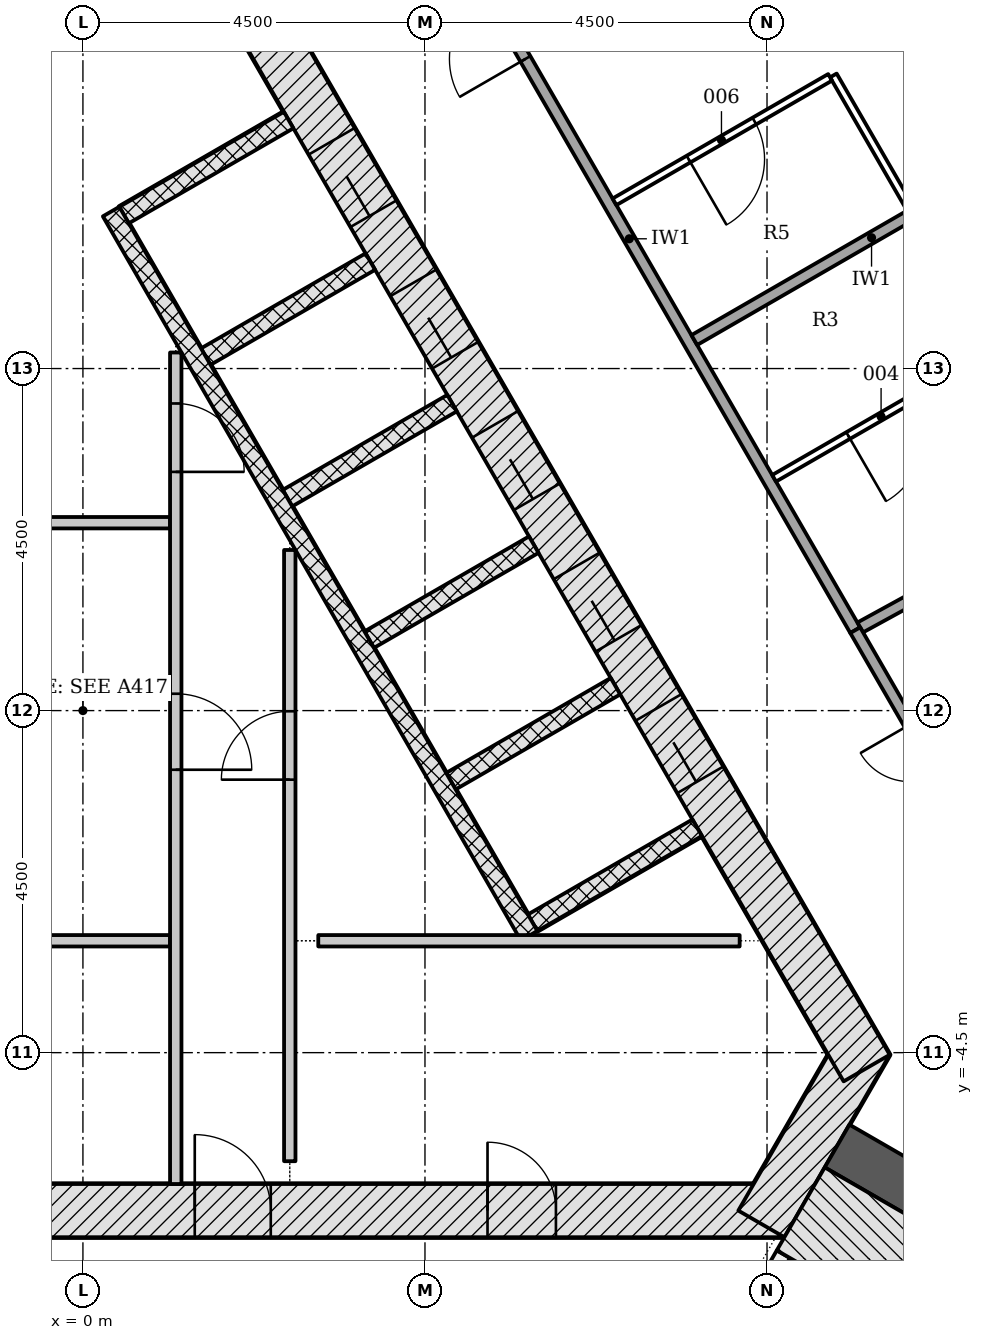
"""IFC4 building model, lengths in metres.
Left out: names, types, materials, properties, quantities, classifications, styles, units other than length and angle.
Written with IfcOpenShell. Run it as: python <this file> out.ifc"""

import sys

from ifc_helpers import new_model, si_unit, direction, frame, frame_2d, origin, place, context, subcontext, project, spatial, rectangle, extrude, element, fill, save


model = new_model("IFC4")
c1 = context("Model", 3, precision=1e-05, world=origin(), true_north=direction((0.0, 1.0)))
c2 = subcontext(c1, "Body", "Model", "MODEL_VIEW")
j1 = project(units=[si_unit("LENGTHUNIT", "METRE"), si_unit("PLANEANGLEUNIT", "RADIAN")], contexts=[c1])
p1 = place(None, origin())
s1 = spatial("IfcSite", under=j1, at=p1, CompositionType="ELEMENT")
p2 = place(p1, origin())
s2 = spatial("IfcBuilding", under=s1, at=p2, CompositionType="ELEMENT")
p3 = place(p2, frame((0.0, 0.0, 222.0)))
s3 = spatial("IfcBuildingStorey", under=s2, at=p3, CompositionType="ELEMENT", Elevation=222.0)
p4 = place(p3, frame((-9.229, -6.578, -0.2), z_axis=(0.0, 0.0, 1.0), x_axis=(1.0, 0.0, 0.0)))
e1 = element("IfcWall", 1, at=p4, inside=s3, PredefinedType="SHEAR", context=c2, shape_type="SweptSolid", body=[
    extrude(rectangle(XDim=18.458, YDim=0.7, at=frame_2d((9.229, 0.0))), origin(), (0.0, 0.0, 1.0), 3.6),
])
p5 = place(p4, frame((10.7, 0.0, 0.2)))
e2 = element("IfcOpeningElement", 2, at=p5, cuts=e1, PredefinedType="OPENING", context=c2, shape_type="SweptSolid", body=[
    extrude(rectangle(XDim=1.0, YDim=2.1, at=frame_2d((0.5, 1.05))), frame((0.0, 0.36, 0.0), z_axis=(0.0, -1.0, 0.0), x_axis=(1.0, 0.0, 0.0)), (0.0, 0.0, 1.0), 0.72),
])
p6 = place(p4, frame((4.977, 0.0, 0.2)))
e3 = element("IfcOpeningElement", 3, at=p6, cuts=e1, PredefinedType="OPENING", context=c2, shape_type="SweptSolid", body=[
    extrude(rectangle(XDim=0.9, YDim=2.1, at=frame_2d((0.45, 1.05))), frame((0.0, 0.36, 0.0), z_axis=(0.0, -1.0, 0.0), x_axis=(1.0, 0.0, 0.0)), (0.0, 0.0, 1.0), 0.72),
])
p7 = place(p4, frame((14.552, 0.0, 0.2)))
e4 = element("IfcOpeningElement", 4, at=p7, cuts=e1, PredefinedType="OPENING", context=c2, shape_type="SweptSolid", body=[
    extrude(rectangle(XDim=0.9, YDim=2.1, at=frame_2d((0.45, 1.05))), frame((0.0, 0.36, 0.0), z_axis=(0.0, -1.0, 0.0), x_axis=(1.0, 0.0, 0.0)), (0.0, 0.0, 1.0), 0.72),
])
p8 = place(p3, frame((8.926, -6.753, -0.2), z_axis=(0.0, 0.0, 1.0), x_axis=(0.500042739161, 0.866000726912, 0.0)))
e5 = element("IfcWall", 5, at=p8, inside=s3, PredefinedType="SHEAR", context=c2, shape_type="SweptSolid", body=[
    extrude(rectangle(XDim=2.771, YDim=0.7, at=frame_2d((1.386, 0.0))), origin(), (0.0, 0.0, 1.0), 3.6),
])
p9 = place(p3, frame((10.311, -4.703, -0.2), z_axis=(0.0, 0.0, 1.0), x_axis=(-0.500001446645, 0.866024568562, 0.0)))
e6 = element("IfcWall", 6, at=p9, inside=s3, PredefinedType="SHEAR", context=c2, shape_type="SweptSolid", body=[
    extrude(rectangle(XDim=18.458, YDim=0.7, at=frame_2d((9.229, 0.0))), origin(), (0.0, 0.0, 1.0), 3.6),
])
p10 = place(p9, frame((4.379, 0.0, 0.2)))
e7 = element("IfcOpeningElement", 7, at=p10, cuts=e6, PredefinedType="OPENING", context=c2, shape_type="SweptSolid", body=[
    extrude(rectangle(XDim=1.1, YDim=2.1, at=frame_2d((0.55, 1.05))), frame((0.0, 0.36, 0.0), z_axis=(0.0, -1.0, 0.0), x_axis=(1.0, 0.0, 0.0)), (0.0, 0.0, 1.0), 0.72),
])
p11 = place(p9, frame((6.529, 0.0, 0.2)))
e8 = element("IfcOpeningElement", 8, at=p11, cuts=e6, PredefinedType="OPENING", context=c2, shape_type="SweptSolid", body=[
    extrude(rectangle(XDim=1.1, YDim=2.1, at=frame_2d((0.55, 1.05))), frame((0.0, 0.36, 0.0), z_axis=(0.0, -1.0, 0.0), x_axis=(1.0, 0.0, 0.0)), (0.0, 0.0, 1.0), 0.72),
])
p12 = place(p9, frame((8.679, 0.0, 0.2)))
e9 = element("IfcOpeningElement", 9, at=p12, cuts=e6, PredefinedType="OPENING", context=c2, shape_type="SweptSolid", body=[
    extrude(rectangle(XDim=1.1, YDim=2.1, at=frame_2d((0.55, 1.05))), frame((0.0, 0.36, 0.0), z_axis=(0.0, -1.0, 0.0), x_axis=(1.0, 0.0, 0.0)), (0.0, 0.0, 1.0), 0.72),
])
p13 = place(p9, frame((10.829, 0.0, 0.2)))
e10 = element("IfcOpeningElement", 10, at=p13, cuts=e6, PredefinedType="OPENING", context=c2, shape_type="SweptSolid", body=[
    extrude(rectangle(XDim=1.1, YDim=2.1, at=frame_2d((0.55, 1.05))), frame((0.0, 0.36, 0.0), z_axis=(0.0, -1.0, 0.0), x_axis=(1.0, 0.0, 0.0)), (0.0, 0.0, 1.0), 0.72),
])
p14 = place(p9, frame((12.979, 0.0, 0.2)))
e11 = element("IfcOpeningElement", 11, at=p14, cuts=e6, PredefinedType="OPENING", context=c2, shape_type="SweptSolid", body=[
    extrude(rectangle(XDim=1.1, YDim=2.1, at=frame_2d((0.55, 1.05))), frame((0.0, 0.36, 0.0), z_axis=(0.0, -1.0, 0.0), x_axis=(1.0, 0.0, 0.0)), (0.0, 0.0, 1.0), 0.72),
])
p15 = place(p3, frame((9.922, -5.728, -0.2), z_axis=(0.0, 0.0, 1.0), x_axis=(0.866030911543, -0.499990460161, 0.0)))
e12 = element("IfcWall", 12, at=p15, inside=s3, PredefinedType="SHEAR", context=c2, shape_type="SweptSolid", body=[
    extrude(rectangle(XDim=8.359, YDim=0.65, at=frame_2d((4.179, 0.0))), origin(), (0.0, 0.0, 1.0), 3.6),
])
for number, where, z_axis, x_axis in (
    (13, (8.081, -1.541, -0.2), (0.0, 0.0, 1.0), (-0.866, -0.5, 0.0)),
    (14, (7.006, 0.321, -0.2), (0.0, 0.0, 1.0), (-0.866, -0.5, 0.0)),
):
    element("IfcWall", number, at=place(p3, frame(where, z_axis=z_axis, x_axis=x_axis)), inside=s3, PredefinedType="PARTITIONING", context=c2, shape_type="SweptSolid", body=[
        extrude(rectangle(XDim=2.5, YDim=0.25, at=frame_2d((1.25, 0.0))), origin(), (0.0, 0.0, 1.0), 3.6),
    ])
p16 = place(p3, frame((5.931, 2.183, -0.2), z_axis=(0.0, 0.0, 1.0), x_axis=(-0.866047370643, -0.499961950354, 0.0)))
e15 = element("IfcWall", 15, at=p16, inside=s3, PredefinedType="PARTITIONING", context=c2, shape_type="SweptSolid", body=[
    extrude(rectangle(XDim=2.5, YDim=0.25, at=frame_2d((1.25, 0.0))), origin(), (0.0, 0.0, 1.0), 3.6),
])
for number, where, z_axis, x_axis in (
    (16, (4.856, 4.045, -0.2), (0.0, 0.0, 1.0), (-0.866, -0.5, 0.0)),
    (17, (3.781, 5.907, -0.2), (0.0, 0.0, 1.0), (-0.866, -0.5, 0.0)),
    (18, (2.706, 7.769, -0.2), (0.0, 0.0, 1.0), (-0.866, -0.5, 0.0)),
):
    element("IfcWall", number, at=place(p3, frame(where, z_axis=z_axis, x_axis=x_axis)), inside=s3, PredefinedType="PARTITIONING", context=c2, shape_type="SweptSolid", body=[
        extrude(rectangle(XDim=2.5, YDim=0.25, at=frame_2d((1.25, 0.0))), origin(), (0.0, 0.0, 1.0), 3.6),
    ])
p17 = place(p3, frame((5.87, -2.961, 0.0), z_axis=(0.0, 0.0, 1.0), x_axis=(-0.50000615651, 0.866021849293, 0.0)))
e19 = element("IfcWall", 19, at=p17, inside=s3, PredefinedType="PARTITIONING", context=c2, shape_type="SweptSolid", body=[
    extrude(rectangle(XDim=11.0, YDim=0.25, at=frame_2d((5.5, 0.0))), origin(), (0.0, 0.0, 1.0), 3.4),
])
p18 = place(p3, frame((-5.258, -3.028, 0.0), z_axis=(0.0, 0.0, 1.0), x_axis=(1.0, 0.0, 0.0)))
e20 = element("IfcWall", 20, at=p18, inside=s3, PredefinedType="PARTITIONING", context=c2, shape_type="SweptSolid", body=[
    extrude(rectangle(XDim=6.404, YDim=0.15, at=frame_2d((3.202, 0.0))), origin(), (0.0, 0.0, 1.0), 3.4),
])
p19 = place(p3, frame((-2.551, 2.472, 0.0), z_axis=(0.0, 0.0, 1.0), x_axis=(1.0, 0.0, 0.0)))
e21 = element("IfcWall", 21, at=p19, inside=s3, PredefinedType="PARTITIONING", context=c2, shape_type="SweptSolid", body=[
    extrude(rectangle(XDim=3.698, YDim=0.15, at=frame_2d((1.849, 0.0))), origin(), (0.0, 0.0, 1.0), 3.4),
])
p20 = place(p3, frame((1.221, 4.711, 0.0), z_axis=(0.0, 0.0, 1.0), x_axis=(0.0, -1.0, 0.0)))
e22 = element("IfcWall", 22, at=p20, inside=s3, PredefinedType="PARTITIONING", context=c2, shape_type="SweptSolid", body=[
    extrude(rectangle(XDim=10.939, YDim=0.15, at=frame_2d((5.47, 0.0))), origin(), (0.0, 0.0, 1.0), 3.4),
])
p21 = place(p20, frame((4.489, 0.0, 0.0)))
e23 = element("IfcOpeningElement", 23, at=p21, cuts=e22, PredefinedType="OPENING", context=c2, shape_type="SweptSolid", body=[
    extrude(rectangle(XDim=1.0, YDim=2.1, at=frame_2d((0.5, 1.05))), frame((0.0, 0.085, 0.0), z_axis=(0.0, -1.0, 0.0), x_axis=(1.0, 0.0, 0.0)), (0.0, 0.0, 1.0), 0.17),
])
p22 = place(p20, frame((0.671, 0.0, 0.0)))
e24 = element("IfcOpeningElement", 24, at=p22, cuts=e22, PredefinedType="OPENING", context=c2, shape_type="SweptSolid", body=[
    extrude(rectangle(XDim=0.9, YDim=2.1, at=frame_2d((0.45, 1.05))), frame((0.0, 0.085, 0.0), z_axis=(0.0, -1.0, 0.0), x_axis=(1.0, 0.0, 0.0)), (0.0, 0.0, 1.0), 0.17),
])
p23 = place(p3, frame((2.721, -5.928, 0.0), z_axis=(0.0, 0.0, 1.0), x_axis=(0.0, 1.0, 0.0)))
e25 = element("IfcWall", 25, at=p23, inside=s3, PredefinedType="PARTITIONING", context=c2, shape_type="SweptSolid", body=[
    extrude(rectangle(XDim=8.041, YDim=0.15, at=frame_2d((4.021, 0.0))), origin(), (0.0, 0.0, 1.0), 3.4),
])
p24 = place(p23, frame((5.02, 0.0, 0.0)))
e26 = element("IfcOpeningElement", 26, at=p24, cuts=e25, PredefinedType="OPENING", context=c2, shape_type="SweptSolid", body=[
    extrude(rectangle(XDim=0.9, YDim=2.1, at=frame_2d((0.45, 1.05))), frame((0.0, 0.085, 0.0), z_axis=(0.0, -1.0, 0.0), x_axis=(1.0, 0.0, 0.0)), (0.0, 0.0, 1.0), 0.17),
])
p25 = place(p3, frame((3.096, -3.028, 0.0), z_axis=(0.0, 0.0, 1.0), x_axis=(1.0, 0.0, 0.0)))
e27 = element("IfcWall", 27, at=p25, inside=s3, PredefinedType="PARTITIONING", context=c2, shape_type="SweptSolid", body=[
    extrude(rectangle(XDim=5.544, YDim=0.15, at=frame_2d((2.772, 0.0))), origin(), (0.0, 0.0, 1.0), 3.4),
])
p26 = place(p3, frame((7.44, -10.226, -0.2), z_axis=(0.0, 0.0, 1.0), x_axis=(0.500022077904, 0.866012656725, 0.0)))
e28 = element("IfcWall", 28, at=p26, inside=s3, PredefinedType="SHEAR", context=c2, shape_type="SweptSolid", body=[
    extrude(rectangle(XDim=3.55, YDim=0.2, at=frame_2d((1.775, 0.0))), origin(), (0.0, 0.0, 1.0), 3.6),
])
p27 = place(p26, frame((1.175, 0.0, 0.2)))
e29 = element("IfcOpeningElement", 29, at=p27, cuts=e28, PredefinedType="OPENING", context=c2, shape_type="SweptSolid", body=[
    extrude(rectangle(XDim=1.2, YDim=2.1, at=frame_2d((0.6, 1.05))), frame((0.0, 0.11, 0.0), z_axis=(0.0, -1.0, 0.0), x_axis=(1.0, 0.0, 0.0)), (0.0, 0.0, 1.0), 0.22),
])
p28 = place(p3, frame((9.444, -6.555, -0.2), z_axis=(0.0, 0.0, 1.0), x_axis=(0.866018442252, -0.500012057535, 0.0)))
e30 = element("IfcWall", 30, at=p28, inside=s3, PredefinedType="SHEAR", context=c2, shape_type="SweptSolid", body=[
    extrude(rectangle(XDim=7.2, YDim=1.261, at=frame_2d((3.6, 0.0))), origin(), (0.0, 0.0, 1.0), 3.6),
])
p29 = place(p3, frame((10.161, 1.058, 0.0), z_axis=(0.0, 0.0, 1.0), x_axis=(-0.500000866012, 0.866024903792, 0.0)))
e31 = element("IfcWall", 31, at=p29, inside=s3, PredefinedType="PARTITIONING", context=c2, shape_type="SweptSolid", body=[
    extrude(rectangle(XDim=11.892, YDim=0.15, at=frame_2d((5.946, 0.0))), origin(), (0.0, 0.0, 1.0), 2.852),
])
p30 = place(p29, frame((8.678, 0.0, 0.0)))
e32 = element("IfcOpeningElement", 32, at=p30, cuts=e31, PredefinedType="OPENING", context=c2, shape_type="SweptSolid", body=[
    extrude(rectangle(XDim=1.0, YDim=2.1, at=frame_2d((0.5, 1.05))), frame((0.0, 0.085, 0.0), z_axis=(0.0, -1.0, 0.0), x_axis=(1.0, 0.0, 0.0)), (0.0, 0.0, 1.0), 0.17),
])
p31 = place(p3, frame((14.91, 3.661, 0.0), z_axis=(0.0, 0.0, 1.0), x_axis=(-0.87687518663, -0.480718116023, 0.0)))
e33 = element("IfcWall", 33, at=p31, inside=s3, PredefinedType="PARTITIONING", context=c2, shape_type="SweptSolid", body=[
    extrude(rectangle(XDim=5.341, YDim=0.15, at=frame_2d((2.671, 0.0))), origin(), (0.0, 0.0, 1.0), 3.4),
])
p32 = place(p31, frame((2.208, 0.0, 0.0)))
e34 = element("IfcOpeningElement", 34, at=p32, cuts=e33, PredefinedType="OPENING", context=c2, shape_type="SweptSolid", body=[
    extrude(rectangle(XDim=1.0, YDim=2.1, at=frame_2d((0.5, 1.05))), frame((0.0, 0.085, 0.0), z_axis=(0.0, -1.0, 0.0), x_axis=(1.0, 0.0, 0.0)), (0.0, 0.0, 1.0), 0.17),
])
p33 = place(p3, frame((12.345, -2.725, 0.0), z_axis=(0.0, 0.0, 1.0), x_axis=(-0.49999822179, 0.866026430432, 0.0)))
e35 = element("IfcWall", 35, at=p33, inside=s3, PredefinedType="PARTITIONING", context=c2, shape_type="SweptSolid", body=[
    extrude(rectangle(XDim=4.368, YDim=0.15, at=frame_2d((2.184, 0.0))), origin(), (0.0, 0.0, 1.0), 2.852),
])
p34 = place(p33, frame((1.434, 0.0, 0.0)))
e36 = element("IfcOpeningElement", 36, at=p34, cuts=e35, PredefinedType="OPENING", context=c2, shape_type="SweptSolid", body=[
    extrude(rectangle(XDim=1.5, YDim=2.1, at=frame_2d((0.75, 1.05))), frame((0.0, 0.085, 0.0), z_axis=(0.0, -1.0, 0.0), x_axis=(1.0, 0.0, 0.0)), (0.0, 0.0, 1.0), 0.17),
])
p35 = place(p3, frame((11.93, 4.694, 0.0), z_axis=(0.0, 0.0, 1.0), x_axis=(-0.866027924134, -0.499995634601, 0.0)))
e37 = element("IfcWall", 37, at=p35, inside=s3, PredefinedType="PARTITIONING", context=c2, shape_type="SweptSolid", body=[
    extrude(rectangle(XDim=3.275, YDim=0.1, at=frame_2d((1.637, 0.0))), origin(), (0.0, 0.0, 1.0), 3.4),
])
p36 = place(p35, frame((1.15, 0.0, 0.0)))
e38 = element("IfcOpeningElement", 38, at=p36, cuts=e37, PredefinedType="OPENING", context=c2, shape_type="SweptSolid", body=[
    extrude(rectangle(XDim=1.0, YDim=2.1, at=frame_2d((0.5, 1.05))), frame((0.0, 0.06, 0.0), z_axis=(0.0, -1.0, 0.0), x_axis=(1.0, 0.0, 0.0)), (0.0, 0.0, 1.0), 0.12),
])
p37 = place(p3, frame((12.707, 7.567, 0.0), z_axis=(0.0, 0.0, 1.0), x_axis=(-0.866016468327, -0.500015476347, 0.0)))
e39 = element("IfcWall", 39, at=p37, inside=s3, PredefinedType="PARTITIONING", context=c2, shape_type="SweptSolid", body=[
    extrude(rectangle(XDim=5.385, YDim=0.15, at=frame_2d((2.692, 0.0))), origin(), (0.0, 0.0, 1.0), 3.4),
])
p38 = place(p3, frame((10.885, 6.602, 0.0), z_axis=(0.0, 0.0, 1.0), x_axis=(-0.499990325971, 0.866030989016, 0.0)))
e40 = element("IfcWall", 40, at=p38, inside=s3, PredefinedType="PARTITIONING", context=c2, shape_type="SweptSolid", body=[
    extrude(rectangle(XDim=2.025, YDim=0.1, at=frame_2d((1.012, 0.0))), origin(), (0.0, 0.0, 1.0), 3.4),
])
p39 = place(p3, frame((9.83, 8.331, 0.0), z_axis=(0.0, 0.0, 1.0), x_axis=(-0.865995643347, -0.500051543047, 0.0)))
e41 = element("IfcWall", 41, at=p39, inside=s3, PredefinedType="PARTITIONING", context=c2, shape_type="SweptSolid", body=[
    extrude(rectangle(XDim=3.275, YDim=0.1, at=frame_2d((1.638, 0.0))), origin(), (0.0, 0.0, 1.0), 3.4),
])
p40 = place(p39, frame((1.15, 0.0, 0.0)))
e42 = element("IfcOpeningElement", 42, at=p40, cuts=e41, PredefinedType="OPENING", context=c2, shape_type="SweptSolid", body=[
    extrude(rectangle(XDim=1.0, YDim=2.1, at=frame_2d((0.5, 1.05))), frame((0.0, 0.06, 0.0), z_axis=(0.0, -1.0, 0.0), x_axis=(1.0, 0.0, 0.0)), (0.0, 0.0, 1.0), 0.12),
])
p41 = place(p10, origin())
e43 = element("IfcDoor", 43, at=p41, inside=s3, OperationType="DOUBLE_DOOR_SLIDING", PredefinedType="DOOR", context=c2, shape_type="SweptSolid", body=[
    extrude(rectangle(XDim=1.1, YDim=2.1, at=frame_2d((0.55, 1.05))), frame((0.0, 0.025, 0.0), z_axis=(0.0, -1.0, 0.0), x_axis=(1.0, 0.0, 0.0)), (0.0, 0.0, 1.0), 0.05),
])
fill(e7, e43)
p42 = place(p11, origin())
e44 = element("IfcDoor", 44, at=p42, inside=s3, OperationType="DOUBLE_DOOR_SLIDING", PredefinedType="DOOR", context=c2, shape_type="SweptSolid", body=[
    extrude(rectangle(XDim=1.1, YDim=2.1, at=frame_2d((0.55, 1.05))), frame((0.0, 0.025, 0.0), z_axis=(0.0, -1.0, 0.0), x_axis=(1.0, 0.0, 0.0)), (0.0, 0.0, 1.0), 0.05),
])
fill(e8, e44)
p43 = place(p12, origin())
e45 = element("IfcDoor", 45, at=p43, inside=s3, OperationType="DOUBLE_DOOR_SLIDING", PredefinedType="DOOR", context=c2, shape_type="SweptSolid", body=[
    extrude(rectangle(XDim=1.1, YDim=2.1, at=frame_2d((0.55, 1.05))), frame((0.0, 0.025, 0.0), z_axis=(0.0, -1.0, 0.0), x_axis=(1.0, 0.0, 0.0)), (0.0, 0.0, 1.0), 0.05),
])
fill(e9, e45)
p44 = place(p13, origin())
e46 = element("IfcDoor", 46, at=p44, inside=s3, OperationType="DOUBLE_DOOR_SLIDING", PredefinedType="DOOR", context=c2, shape_type="SweptSolid", body=[
    extrude(rectangle(XDim=1.1, YDim=2.1, at=frame_2d((0.55, 1.05))), frame((0.0, 0.025, 0.0), z_axis=(0.0, -1.0, 0.0), x_axis=(1.0, 0.0, 0.0)), (0.0, 0.0, 1.0), 0.05),
])
fill(e10, e46)
p45 = place(p14, origin())
e47 = element("IfcDoor", 47, at=p45, inside=s3, OperationType="DOUBLE_DOOR_SLIDING", PredefinedType="DOOR", context=c2, shape_type="SweptSolid", body=[
    extrude(rectangle(XDim=1.1, YDim=2.1, at=frame_2d((0.55, 1.05))), frame((0.0, 0.025, 0.0), z_axis=(0.0, -1.0, 0.0), x_axis=(1.0, 0.0, 0.0)), (0.0, 0.0, 1.0), 0.05),
])
fill(e11, e47)
p46 = place(p5, origin())
e48 = element("IfcDoor", 48, at=p46, inside=s3, OperationType="SINGLE_SWING_LEFT", PredefinedType="DOOR", context=c2, shape_type="SweptSolid", body=[
    extrude(rectangle(XDim=1.0, YDim=2.1, at=frame_2d((0.5, 1.05))), frame((0.0, 0.075, 0.0), z_axis=(0.0, -1.0, 0.0), x_axis=(1.0, 0.0, 0.0)), (0.0, 0.0, 1.0), 0.15),
])
fill(e2, e48)
p47 = place(p7, origin())
e49 = element("IfcDoor", 49, at=p47, inside=s3, OperationType="SINGLE_SWING_LEFT", PredefinedType="DOOR", context=c2, shape_type="SweptSolid", body=[
    extrude(rectangle(XDim=0.9, YDim=2.1, at=frame_2d((0.45, 1.05))), frame((0.0, 0.075, 0.0), z_axis=(0.0, -1.0, 0.0), x_axis=(1.0, 0.0, 0.0)), (0.0, 0.0, 1.0), 0.15),
])
fill(e4, e49)
p48 = place(p21, origin())
e50 = element("IfcDoor", 50, at=p48, inside=s3, OperationType="SINGLE_SWING_RIGHT", PredefinedType="DOOR", context=c2, shape_type="SweptSolid", body=[
    extrude(rectangle(XDim=1.0, YDim=2.1, at=frame_2d((0.5, 1.05))), frame((0.0, 0.025, 0.0), z_axis=(0.0, -1.0, 0.0), x_axis=(1.0, 0.0, 0.0)), (0.0, 0.0, 1.0), 0.05),
])
fill(e23, e50)
p49 = place(p24, origin())
e51 = element("IfcDoor", 51, at=p49, inside=s3, OperationType="SINGLE_SWING_LEFT", PredefinedType="DOOR", context=c2, shape_type="SweptSolid", body=[
    extrude(rectangle(XDim=0.9, YDim=2.1, at=frame_2d((0.45, 1.05))), frame((0.0, 0.025, 0.0), z_axis=(0.0, -1.0, 0.0), x_axis=(1.0, 0.0, 0.0)), (0.0, 0.0, 1.0), 0.05),
])
fill(e26, e51)
p50 = place(p22, origin())
e52 = element("IfcDoor", 52, at=p50, inside=s3, OperationType="SINGLE_SWING_RIGHT", PredefinedType="DOOR", context=c2, shape_type="SweptSolid", body=[
    extrude(rectangle(XDim=0.9, YDim=2.1, at=frame_2d((0.45, 1.05))), frame((0.0, 0.025, 0.0), z_axis=(0.0, -1.0, 0.0), x_axis=(1.0, 0.0, 0.0)), (0.0, 0.0, 1.0), 0.05),
])
fill(e24, e52)
p51 = place(p36, origin())
e53 = element("IfcDoor", 53, at=p51, inside=s3, OperationType="SINGLE_SWING_RIGHT", PredefinedType="DOOR", context=c2, shape_type="SweptSolid", body=[
    extrude(rectangle(XDim=1.0, YDim=2.1, at=frame_2d((0.5, 1.05))), frame((0.0, 0.025, 0.0), z_axis=(0.0, -1.0, 0.0), x_axis=(1.0, 0.0, 0.0)), (0.0, 0.0, 1.0), 0.05),
])
fill(e38, e53)
p52 = place(p40, origin())
e54 = element("IfcDoor", 54, at=p52, inside=s3, OperationType="SINGLE_SWING_RIGHT", PredefinedType="DOOR", context=c2, shape_type="SweptSolid", body=[
    extrude(rectangle(XDim=1.0, YDim=2.1, at=frame_2d((0.5, 1.05))), frame((0.0, 0.025, 0.0), z_axis=(0.0, -1.0, 0.0), x_axis=(1.0, 0.0, 0.0)), (0.0, 0.0, 1.0), 0.05),
])
fill(e42, e54)
p53 = place(p30, origin())
e55 = element("IfcDoor", 55, at=p53, inside=s3, OperationType="SINGLE_SWING_LEFT", PredefinedType="DOOR", context=c2, shape_type="SweptSolid", body=[
    extrude(rectangle(XDim=1.0, YDim=2.1, at=frame_2d((0.5, 1.05))), frame((0.0, 0.025, 0.0), z_axis=(0.0, -1.0, 0.0), x_axis=(1.0, 0.0, 0.0)), (0.0, 0.0, 1.0), 0.05),
])
fill(e32, e55)
save(model, sys.argv[1])
